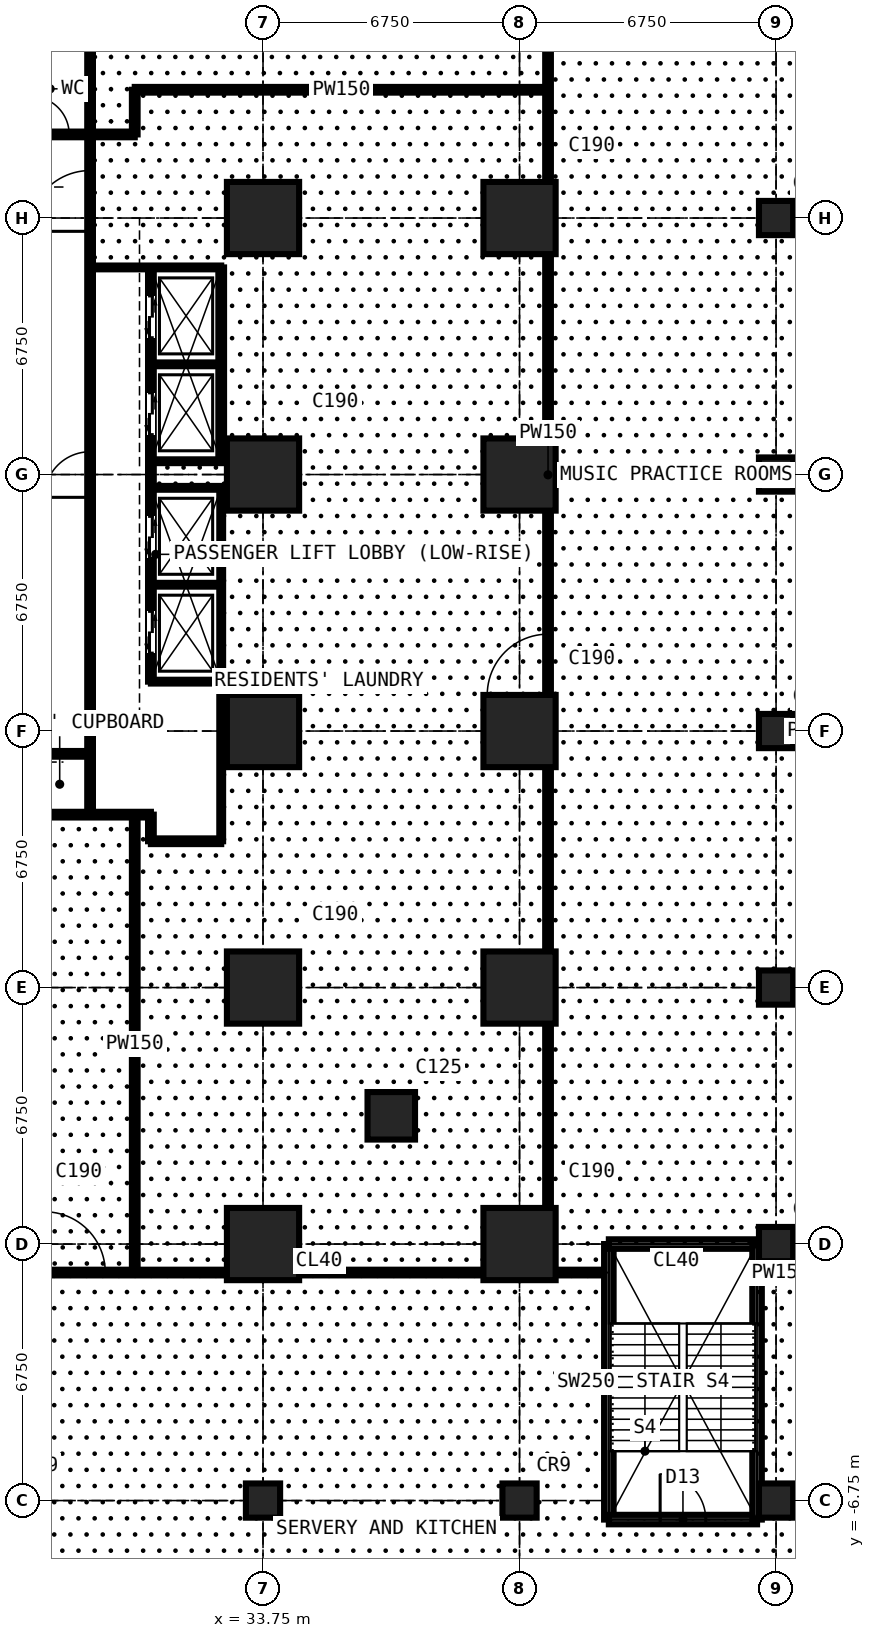
"""IFC4 building model, lengths in metres.
Left out: names, types, materials, properties, quantities, classifications, styles, units other than length and angle.
Written with IfcOpenShell. Run it as: python <this file> out.ifc"""

import sys

from ifc_helpers import new_model, si_unit, direction, frame, frame_2d, origin, origin_2d, place, context, subcontext, project, spatial, rectangle, circle, extrude, element, fill, save


model = new_model("IFC4")
c1 = context("Model", 3, precision=1e-05, world=origin(), true_north=direction((0.0, 1.0)))
c2 = subcontext(c1, "Body", "Model", "MODEL_VIEW")
j1 = project(units=[si_unit("LENGTHUNIT", "METRE"), si_unit("PLANEANGLEUNIT", "RADIAN")], contexts=[c1])
p1 = place(None, origin())
s1 = spatial("IfcSite", under=j1, at=p1, CompositionType="ELEMENT")
p2 = place(p1, origin())
s2 = spatial("IfcBuilding", under=s1, at=p2, CompositionType="ELEMENT")
p3 = place(p2, frame((0.0, 0.0, 4.5)))
s3 = spatial("IfcBuildingStorey", under=s2, at=p3, CompositionType="ELEMENT", Elevation=4.5)
p4 = place(p3, frame((33.75, -6.75, 0.0), z_axis=(0.0, 0.0, 1.0), x_axis=(1.0, 0.0, 0.0)))
e1 = element("IfcColumn", 1, at=p4, inside=s3, PredefinedType="COLUMN", context=c2, shape_type="SweptSolid", body=[
    extrude(circle(Radius=0.45, at=origin_2d()), origin(), (0.0, 0.0, 1.0), 4.5),
])
for number, where, z_axis, x_axis in (
    (2, (33.75, 0.0, 0.0), (0.0, 0.0, 1.0), (1.0, 0.0, 0.0)),
    (3, (33.75, 6.75, 0.0), (0.0, 0.0, 1.0), (1.0, 0.0, 0.0)),
    (4, (33.75, 13.5, 0.0), (0.0, 0.0, 1.0), (1.0, 0.0, 0.0)),
    (5, (33.75, 20.25, 0.0), (0.0, 0.0, 1.0), (1.0, 0.0, 0.0)),
    (6, (33.75, 27.0, 0.0), (0.0, 0.0, 1.0), (1.0, 0.0, 0.0)),
):
    element("IfcColumn", number, at=place(p3, frame(where, z_axis=z_axis, x_axis=x_axis)), inside=s3, PredefinedType="COLUMN", context=c2, shape_type="SweptSolid", body=[
        extrude(rectangle(XDim=1.9, YDim=1.9, at=origin_2d()), origin(), (0.0, 0.0, 1.0), 4.5),
    ])
p5 = place(p3, frame((37.125, 3.375, 0.0), z_axis=(0.0, 0.0, 1.0), x_axis=(1.0, 0.0, 0.0)))
e7 = element("IfcColumn", 7, at=p5, inside=s3, PredefinedType="COLUMN", context=c2, shape_type="SweptSolid", body=[
    extrude(rectangle(XDim=1.25, YDim=1.25, at=origin_2d()), origin(), (0.0, 0.0, 1.0), 4.5),
])
p6 = place(p3, frame((40.5, -6.75, 0.0), z_axis=(0.0, 0.0, 1.0), x_axis=(1.0, 0.0, 0.0)))
e8 = element("IfcColumn", 8, at=p6, inside=s3, PredefinedType="COLUMN", context=c2, shape_type="SweptSolid", body=[
    extrude(circle(Radius=0.45, at=origin_2d()), origin(), (0.0, 0.0, 1.0), 4.5),
])
for number, where, z_axis, x_axis in (
    (9, (40.5, 0.0, 0.0), (0.0, 0.0, 1.0), (1.0, 0.0, 0.0)),
    (10, (40.5, 6.75, 0.0), (0.0, 0.0, 1.0), (1.0, 0.0, 0.0)),
    (11, (40.5, 13.5, 0.0), (0.0, 0.0, 1.0), (1.0, 0.0, 0.0)),
    (12, (40.5, 20.25, 0.0), (0.0, 0.0, 1.0), (1.0, 0.0, 0.0)),
    (13, (40.5, 27.0, 0.0), (0.0, 0.0, 1.0), (1.0, 0.0, 0.0)),
):
    element("IfcColumn", number, at=place(p3, frame(where, z_axis=z_axis, x_axis=x_axis)), inside=s3, PredefinedType="COLUMN", context=c2, shape_type="SweptSolid", body=[
        extrude(rectangle(XDim=1.9, YDim=1.9, at=origin_2d()), origin(), (0.0, 0.0, 1.0), 4.5),
    ])
for number, where, z_axis, x_axis in (
    (14, (47.25, -6.75, 0.0), (0.0, 0.0, 1.0), (1.0, 0.0, 0.0)),
    (15, (47.25, 0.0, 0.0), (0.0, 0.0, 1.0), (1.0, 0.0, 0.0)),
    (16, (47.25, 6.75, 0.0), (0.0, 0.0, 1.0), (1.0, 0.0, 0.0)),
    (17, (47.25, 13.5, 0.0), (0.0, 0.0, 1.0), (1.0, 0.0, 0.0)),
    (18, (47.25, 20.25, 0.0), (0.0, 0.0, 1.0), (1.0, 0.0, 0.0)),
    (19, (47.25, 27.0, 0.0), (0.0, 0.0, 1.0), (1.0, 0.0, 0.0)),
):
    element("IfcColumn", number, at=place(p3, frame(where, z_axis=z_axis, x_axis=x_axis)), inside=s3, PredefinedType="COLUMN", context=c2, shape_type="SweptSolid", body=[
        extrude(circle(Radius=0.45, at=origin_2d()), origin(), (0.0, 0.0, 1.0), 4.5),
    ])
p7 = place(p3, frame((-7.484, -0.75, 0.0), z_axis=(0.0, 0.0, 1.0), x_axis=(1.0, 0.0, 0.0)))
e20 = element("IfcWall", 20, at=p7, inside=s3, PredefinedType="PARTITIONING", context=c2, shape_type="SweptSolid", body=[
    extrude(rectangle(XDim=50.334, YDim=0.15, at=frame_2d((25.167, 0.0))), origin(), (0.0, 0.0, 1.0), 4.25),
])
p8 = place(p7, frame((18.384, 0.0, 0.0)))
e21 = element("IfcOpeningElement", 21, at=p8, cuts=e20, PredefinedType="OPENING", context=c2, shape_type="SweptSolid", body=[
    extrude(rectangle(XDim=1.6, YDim=2.4, at=frame_2d((0.8, 1.2))), frame((0.0, 0.085, 0.0), z_axis=(0.0, -1.0, 0.0), x_axis=(1.0, 0.0, 0.0)), (0.0, 0.0, 1.0), 0.17),
])
p9 = place(p7, frame((35.484, 0.0, 0.0)))
e22 = element("IfcOpeningElement", 22, at=p9, cuts=e20, PredefinedType="OPENING", context=c2, shape_type="SweptSolid", body=[
    extrude(rectangle(XDim=1.6, YDim=2.4, at=frame_2d((0.8, 1.2))), frame((0.0, 0.085, 0.0), z_axis=(0.0, -1.0, 0.0), x_axis=(1.0, 0.0, 0.0)), (0.0, 0.0, 1.0), 0.17),
])
p10 = place(p3, frame((8.9, 29.2, 0.0), z_axis=(0.0, 0.0, 1.0), x_axis=(1.0, 0.0, 0.0)))
e23 = element("IfcWall", 23, at=p10, inside=s3, PredefinedType="PARTITIONING", context=c2, shape_type="SweptSolid", body=[
    extrude(rectangle(XDim=21.475, YDim=0.15, at=frame_2d((10.738, 0.0))), origin(), (0.0, 0.0, 1.0), 4.25),
])
p11 = place(p10, frame((16.65, 0.0, 0.0)))
e24 = element("IfcOpeningElement", 24, at=p11, cuts=e23, PredefinedType="OPENING", context=c2, shape_type="SweptSolid", body=[
    extrude(rectangle(XDim=1.0, YDim=2.2, at=frame_2d((0.5, 1.1))), frame((0.0, 0.085, 0.0), z_axis=(0.0, -1.0, 0.0), x_axis=(1.0, 0.0, 0.0)), (0.0, 0.0, 1.0), 0.17),
])
p12 = place(p10, frame((18.75, 0.0, 0.0)))
e25 = element("IfcOpeningElement", 25, at=p12, cuts=e23, PredefinedType="OPENING", context=c2, shape_type="SweptSolid", body=[
    extrude(rectangle(XDim=1.0, YDim=2.2, at=frame_2d((0.5, 1.1))), frame((0.0, 0.085, 0.0), z_axis=(0.0, -1.0, 0.0), x_axis=(1.0, 0.0, 0.0)), (0.0, 0.0, 1.0), 0.17),
])
p13 = place(p10, frame((8.45, 0.0, 0.0)))
e26 = element("IfcOpeningElement", 26, at=p13, cuts=e23, PredefinedType="OPENING", context=c2, shape_type="SweptSolid", body=[
    extrude(rectangle(XDim=1.6, YDim=2.4, at=frame_2d((0.8, 1.2))), frame((0.0, 0.085, 0.0), z_axis=(0.0, -1.0, 0.0), x_axis=(1.0, 0.0, 0.0)), (0.0, 0.0, 1.0), 0.17),
])
p14 = place(p3, frame((10.125, 11.3, 0.0), z_axis=(0.0, 0.0, 1.0), x_axis=(1.0, 0.0, 0.0)))
e27 = element("IfcWall", 27, at=p14, inside=s3, PredefinedType="PARTITIONING", context=c2, shape_type="SweptSolid", body=[
    extrude(rectangle(XDim=20.675, YDim=0.15, at=frame_2d((10.337, 0.0))), origin(), (0.0, 0.0, 1.0), 4.25),
])
p15 = place(p14, frame((1.725, 0.0, 0.0)))
e28 = element("IfcOpeningElement", 28, at=p15, cuts=e27, PredefinedType="OPENING", context=c2, shape_type="SweptSolid", body=[
    extrude(rectangle(XDim=1.0, YDim=2.2, at=frame_2d((0.5, 1.1))), frame((0.0, 0.085, 0.0), z_axis=(0.0, -1.0, 0.0), x_axis=(1.0, 0.0, 0.0)), (0.0, 0.0, 1.0), 0.17),
])
p16 = place(p14, frame((3.825, 0.0, 0.0)))
e29 = element("IfcOpeningElement", 29, at=p16, cuts=e27, PredefinedType="OPENING", context=c2, shape_type="SweptSolid", body=[
    extrude(rectangle(XDim=1.0, YDim=2.2, at=frame_2d((0.5, 1.1))), frame((0.0, 0.085, 0.0), z_axis=(0.0, -1.0, 0.0), x_axis=(1.0, 0.0, 0.0)), (0.0, 0.0, 1.0), 0.17),
])
p17 = place(p14, frame((10.625, 0.0, 0.0)))
e30 = element("IfcOpeningElement", 30, at=p17, cuts=e27, PredefinedType="OPENING", context=c2, shape_type="SweptSolid", body=[
    extrude(rectangle(XDim=1.6, YDim=2.4, at=frame_2d((0.8, 1.2))), frame((0.0, 0.085, 0.0), z_axis=(0.0, -1.0, 0.0), x_axis=(1.0, 0.0, 0.0)), (0.0, 0.0, 1.0), 0.17),
])
p18 = place(p3, frame((27.6, 12.9, 0.0), z_axis=(0.0, 0.0, 1.0), x_axis=(1.0, 0.0, 0.0)))
e31 = element("IfcWall", 31, at=p18, inside=s3, PredefinedType="PARTITIONING", context=c2, shape_type="SweptSolid", body=[
    extrude(rectangle(XDim=1.6, YDim=0.15, at=frame_2d((0.8, 0.0))), origin(), (0.0, 0.0, 1.0), 3.752),
])
p19 = place(p3, frame((29.2, 11.3, 0.0), z_axis=(0.0, 0.0, 1.0), x_axis=(0.0, 1.0, 0.0)))
e32 = element("IfcWall", 32, at=p19, inside=s3, PredefinedType="PARTITIONING", context=c2, shape_type="SweptSolid", body=[
    extrude(rectangle(XDim=20.3, YDim=0.15, at=frame_2d((10.15, 0.0))), origin(), (0.0, 0.0, 1.0), 4.25),
])
p20 = place(p19, frame((15.35, 0.0, 0.0)))
e33 = element("IfcOpeningElement", 33, at=p20, cuts=e32, PredefinedType="OPENING", context=c2, shape_type="SweptSolid", body=[
    extrude(rectangle(XDim=1.6, YDim=2.4, at=frame_2d((0.8, 1.2))), frame((0.0, 0.085, 0.0), z_axis=(0.0, -1.0, 0.0), x_axis=(1.0, 0.0, 0.0)), (0.0, 0.0, 1.0), 0.17),
])
p21 = place(p19, frame((8.35, 0.0, 0.0)))
e34 = element("IfcOpeningElement", 34, at=p21, cuts=e32, PredefinedType="OPENING", context=c2, shape_type="SweptSolid", body=[
    extrude(rectangle(XDim=1.2, YDim=2.2, at=frame_2d((0.6, 1.1))), frame((0.0, 0.085, 0.0), z_axis=(0.0, -1.0, 0.0), x_axis=(1.0, 0.0, 0.0)), (0.0, 0.0, 1.0), 0.17),
])
p22 = place(p3, frame((29.2, 25.7, 0.0), z_axis=(0.0, 0.0, 1.0), x_axis=(1.0, 0.0, 0.0)))
e35 = element("IfcWall", 35, at=p22, inside=s3, PredefinedType="SHEAR", context=c2, shape_type="SweptSolid", body=[
    extrude(rectangle(XDim=3.45, YDim=0.1, at=frame_2d((1.725, 0.0))), origin(), (0.0, 0.0, 1.0), 4.25),
])
p23 = place(p3, frame((30.375, -0.75, 0.0), z_axis=(0.0, 0.0, 1.0), x_axis=(0.0, 1.0, 0.0)))
e36 = element("IfcWall", 36, at=p23, inside=s3, PredefinedType="PARTITIONING", context=c2, shape_type="SweptSolid", body=[
    extrude(rectangle(XDim=12.05, YDim=0.15, at=frame_2d((6.025, 0.0))), origin(), (0.0, 0.0, 1.0), 4.25),
])
p24 = place(p3, frame((30.375, 29.2, 0.0), z_axis=(0.0, 0.0, 1.0), x_axis=(0.0, 1.0, 0.0)))
e37 = element("IfcWall", 37, at=p24, inside=s3, PredefinedType="PARTITIONING", context=c2, shape_type="SweptSolid", body=[
    extrude(rectangle(XDim=1.175, YDim=0.15, at=frame_2d((0.587, 0.0))), origin(), (0.0, 0.0, 1.0), 4.25),
])
p25 = place(p3, frame((30.375, 30.375, 0.0), z_axis=(0.0, 0.0, 1.0), x_axis=(1.0, 0.0, 0.0)))
e38 = element("IfcWall", 38, at=p25, inside=s3, PredefinedType="PARTITIONING", context=c2, shape_type="SweptSolid", body=[
    extrude(rectangle(XDim=10.875, YDim=0.15, at=frame_2d((5.438, 0.0))), origin(), (0.0, 0.0, 1.0), 4.25),
])
p26 = place(p3, frame((30.8, 10.6, 0.0), z_axis=(0.0, 0.0, 1.0), x_axis=(0.0, 1.0, 0.0)))
e39 = element("IfcWall", 39, at=p26, inside=s3, PredefinedType="PARTITIONING", context=c2, shape_type="SweptSolid", body=[
    extrude(rectangle(XDim=0.7, YDim=0.15, at=frame_2d((0.35, 0.0))), origin(), (0.0, 0.0, 1.0), 4.25),
])
p27 = place(p3, frame((30.8, 10.6, 0.0), z_axis=(0.0, 0.0, 1.0), x_axis=(1.0, 0.0, 0.0)))
e40 = element("IfcWall", 40, at=p27, inside=s3, PredefinedType="PARTITIONING", context=c2, shape_type="SweptSolid", body=[
    extrude(rectangle(XDim=1.85, YDim=0.15, at=frame_2d((0.925, 0.0))), origin(), (0.0, 0.0, 1.0), 4.25),
])
p28 = place(p3, frame((30.8, 14.8, 0.0), z_axis=(0.0, 0.0, 1.0), x_axis=(0.0, 1.0, 0.0)))
e41 = element("IfcWall", 41, at=p28, inside=s3, PredefinedType="PARTITIONING", context=c2, shape_type="SweptSolid", body=[
    extrude(rectangle(XDim=10.9, YDim=0.15, at=frame_2d((5.45, 0.0))), origin(), (0.0, 0.0, 1.0), 4.25),
])
p29 = place(p28, frame((0.75, 0.0, 0.0)))
e42 = element("IfcOpeningElement", 42, at=p29, cuts=e41, PredefinedType="OPENING", context=c2, shape_type="SweptSolid", body=[
    extrude(rectangle(XDim=1.1, YDim=2.2, at=frame_2d((0.55, 1.1))), frame((0.0, 0.085, 0.0), z_axis=(0.0, -1.0, 0.0), x_axis=(1.0, 0.0, 0.0)), (0.0, 0.0, 1.0), 0.17),
])
p30 = place(p28, frame((3.25, 0.0, 0.0)))
e43 = element("IfcOpeningElement", 43, at=p30, cuts=e41, PredefinedType="OPENING", context=c2, shape_type="SweptSolid", body=[
    extrude(rectangle(XDim=1.1, YDim=2.2, at=frame_2d((0.55, 1.1))), frame((0.0, 0.085, 0.0), z_axis=(0.0, -1.0, 0.0), x_axis=(1.0, 0.0, 0.0)), (0.0, 0.0, 1.0), 0.17),
])
p31 = place(p28, frame((6.5, 0.0, 0.0)))
e44 = element("IfcOpeningElement", 44, at=p31, cuts=e41, PredefinedType="OPENING", context=c2, shape_type="SweptSolid", body=[
    extrude(rectangle(XDim=1.1, YDim=2.2, at=frame_2d((0.55, 1.1))), frame((0.0, 0.085, 0.0), z_axis=(0.0, -1.0, 0.0), x_axis=(1.0, 0.0, 0.0)), (0.0, 0.0, 1.0), 0.17),
])
p32 = place(p28, frame((9.05, 0.0, 0.0)))
e45 = element("IfcOpeningElement", 45, at=p32, cuts=e41, PredefinedType="OPENING", context=c2, shape_type="SweptSolid", body=[
    extrude(rectangle(XDim=1.1, YDim=2.2, at=frame_2d((0.55, 1.1))), frame((0.0, 0.085, 0.0), z_axis=(0.0, -1.0, 0.0), x_axis=(1.0, 0.0, 0.0)), (0.0, 0.0, 1.0), 0.17),
])
for number, where, z_axis, x_axis in (
    (46, (30.8, 14.8, 0.0), (0.0, 0.0, 1.0), (1.0, 0.0, 0.0)),
    (47, (30.8, 17.35, 0.0), (0.0, 0.0, 1.0), (1.0, 0.0, 0.0)),
    (48, (30.8, 19.9, 0.0), (0.0, 0.0, 1.0), (1.0, 0.0, 0.0)),
    (49, (30.8, 20.6, 0.0), (0.0, 0.0, 1.0), (1.0, 0.0, 0.0)),
    (50, (30.8, 23.15, 0.0), (0.0, 0.0, 1.0), (1.0, 0.0, 0.0)),
):
    element("IfcWall", number, at=place(p3, frame(where, z_axis=z_axis, x_axis=x_axis)), inside=s3, PredefinedType="SHEAR", context=c2, shape_type="SweptSolid", body=[
        extrude(rectangle(XDim=1.85, YDim=0.1, at=frame_2d((0.925, 0.0))), origin(), (0.0, 0.0, 1.0), 4.25),
    ])
p33 = place(p3, frame((32.65, 10.6, 0.0), z_axis=(0.0, 0.0, 1.0), x_axis=(0.0, 1.0, 0.0)))
e51 = element("IfcWall", 51, at=p33, inside=s3, PredefinedType="SHEAR", context=c2, shape_type="SweptSolid", body=[
    extrude(rectangle(XDim=9.3, YDim=0.1, at=frame_2d((4.65, 0.0))), origin(), (0.0, 0.0, 1.0), 4.25),
])
p34 = place(p3, frame((32.65, 20.6, 0.0), z_axis=(0.0, 0.0, 1.0), x_axis=(0.0, 1.0, 0.0)))
e52 = element("IfcWall", 52, at=p34, inside=s3, PredefinedType="PARTITIONING", context=c2, shape_type="SweptSolid", body=[
    extrude(rectangle(XDim=5.1, YDim=0.15, at=frame_2d((2.55, 0.0))), origin(), (0.0, 0.0, 1.0), 4.25),
])
p35 = place(p3, frame((41.25, -0.75, 0.0), z_axis=(0.0, 0.0, 1.0), x_axis=(0.0, 1.0, 0.0)))
e53 = element("IfcWall", 53, at=p35, inside=s3, PredefinedType="PARTITIONING", context=c2, shape_type="SweptSolid", body=[
    extrude(rectangle(XDim=41.984, YDim=0.15, at=frame_2d((20.992, 0.0))), origin(), (0.0, 0.0, 1.0), 4.25),
])
p36 = place(p35, frame((15.2, 0.0, 0.0)))
e54 = element("IfcOpeningElement", 54, at=p36, cuts=e53, PredefinedType="OPENING", context=c2, shape_type="SweptSolid", body=[
    extrude(rectangle(XDim=1.6, YDim=2.4, at=frame_2d((0.8, 1.2))), frame((0.0, 0.085, 0.0), z_axis=(0.0, -1.0, 0.0), x_axis=(1.0, 0.0, 0.0)), (0.0, 0.0, 1.0), 0.17),
])
p37 = place(p3, frame((42.85, -7.25, 0.0), z_axis=(0.0, 0.0, 1.0), x_axis=(0.0, 1.0, 0.0)))
e55 = element("IfcWall", 55, at=p37, inside=s3, PredefinedType="SOLIDWALL", context=c2, shape_type="SweptSolid", body=[
    extrude(rectangle(XDim=7.25, YDim=0.25, at=frame_2d((3.625, 0.0))), origin(), (0.0, 0.0, 1.0), 4.25),
])
p38 = place(p3, frame((42.85, -7.25, 0.0), z_axis=(0.0, 0.0, 1.0), x_axis=(1.0, 0.0, 0.0)))
e56 = element("IfcWall", 56, at=p38, inside=s3, PredefinedType="SOLIDWALL", context=c2, shape_type="SweptSolid", body=[
    extrude(rectangle(XDim=3.9, YDim=0.25, at=frame_2d((1.95, 0.0))), origin(), (0.0, 0.0, 1.0), 4.25),
])
p39 = place(p38, frame((1.35, 0.0, 0.0)))
e57 = element("IfcOpeningElement", 57, at=p39, cuts=e56, PredefinedType="OPENING", context=c2, shape_type="SweptSolid", body=[
    extrude(rectangle(XDim=1.2, YDim=2.2, at=frame_2d((0.6, 1.1))), frame((0.0, 0.135, 0.0), z_axis=(0.0, -1.0, 0.0), x_axis=(1.0, 0.0, 0.0)), (0.0, 0.0, 1.0), 0.27),
])
p40 = place(p3, frame((42.85, 0.0, 0.0), z_axis=(0.0, 0.0, 1.0), x_axis=(1.0, 0.0, 0.0)))
e58 = element("IfcWall", 58, at=p40, inside=s3, PredefinedType="SOLIDWALL", context=c2, shape_type="SweptSolid", body=[
    extrude(rectangle(XDim=3.9, YDim=0.25, at=frame_2d((1.95, 0.0))), origin(), (0.0, 0.0, 1.0), 4.25),
])
p41 = place(p3, frame((46.75, -7.25, 0.0), z_axis=(0.0, 0.0, 1.0), x_axis=(0.0, 1.0, 0.0)))
e59 = element("IfcWall", 59, at=p41, inside=s3, PredefinedType="SOLIDWALL", context=c2, shape_type="SweptSolid", body=[
    extrude(rectangle(XDim=7.25, YDim=0.25, at=frame_2d((3.625, 0.0))), origin(), (0.0, 0.0, 1.0), 4.25),
])
p42 = place(p3, frame((46.75, -0.75, 0.0), z_axis=(0.0, 0.0, 1.0), x_axis=(1.0, 0.0, 0.0)))
e60 = element("IfcWall", 60, at=p42, inside=s3, PredefinedType="PARTITIONING", context=c2, shape_type="SweptSolid", body=[
    extrude(rectangle(XDim=1.234, YDim=0.15, at=frame_2d((0.617, 0.0))), origin(), (0.0, 0.0, 1.0), 4.25),
])
p43 = place(p20, origin())
e61 = element("IfcDoor", 61, at=p43, inside=s3, OperationType="DOUBLE_DOOR_SINGLE_SWING", PredefinedType="DOOR", context=c2, shape_type="SweptSolid", body=[
    extrude(rectangle(XDim=1.6, YDim=2.4, at=frame_2d((0.8, 1.2))), frame((0.0, 0.025, 0.0), z_axis=(0.0, -1.0, 0.0), x_axis=(1.0, 0.0, 0.0)), (0.0, 0.0, 1.0), 0.05),
])
fill(e33, e61)
p44 = place(p12, origin())
e62 = element("IfcDoor", 62, at=p44, inside=s3, OperationType="SINGLE_SWING_LEFT", PredefinedType="DOOR", context=c2, shape_type="SweptSolid", body=[
    extrude(rectangle(XDim=1.0, YDim=2.2, at=frame_2d((0.5, 1.1))), frame((0.0, 0.025, 0.0), z_axis=(0.0, -1.0, 0.0), x_axis=(1.0, 0.0, 0.0)), (0.0, 0.0, 1.0), 0.05),
])
fill(e25, e62)
p45 = place(p9, origin())
e63 = element("IfcDoor", 63, at=p45, inside=s3, OperationType="DOUBLE_DOOR_SINGLE_SWING", PredefinedType="DOOR", context=c2, shape_type="SweptSolid", body=[
    extrude(rectangle(XDim=1.6, YDim=2.4, at=frame_2d((0.8, 1.2))), frame((0.0, 0.025, 0.0), z_axis=(0.0, -1.0, 0.0), x_axis=(1.0, 0.0, 0.0)), (0.0, 0.0, 1.0), 0.05),
])
fill(e22, e63)
p46 = place(p36, origin())
e64 = element("IfcDoor", 64, at=p46, inside=s3, OperationType="DOUBLE_DOOR_SINGLE_SWING", PredefinedType="DOOR", context=c2, shape_type="SweptSolid", body=[
    extrude(rectangle(XDim=1.6, YDim=2.4, at=frame_2d((0.8, 1.2))), frame((0.0, 0.025, 0.0), z_axis=(0.0, -1.0, 0.0), x_axis=(1.0, 0.0, 0.0)), (0.0, 0.0, 1.0), 0.05),
])
fill(e54, e64)
p47 = place(p39, origin())
e65 = element("IfcDoor", 65, at=p47, inside=s3, OperationType="SINGLE_SWING_LEFT", PredefinedType="DOOR", context=c2, shape_type="SweptSolid", body=[
    extrude(rectangle(XDim=1.2, YDim=2.2, at=frame_2d((0.6, 1.1))), frame((0.0, 0.025, 0.0), z_axis=(0.0, -1.0, 0.0), x_axis=(1.0, 0.0, 0.0)), (0.0, 0.0, 1.0), 0.05),
])
fill(e57, e65)
p48 = place(p29, origin())
e66 = element("IfcDoor", 66, at=p48, inside=s3, OperationType="DOUBLE_DOOR_SLIDING", PredefinedType="DOOR", context=c2, shape_type="SweptSolid", body=[
    extrude(rectangle(XDim=1.1, YDim=2.2, at=frame_2d((0.55, 1.1))), frame((0.0, 0.025, 0.0), z_axis=(0.0, -1.0, 0.0), x_axis=(1.0, 0.0, 0.0)), (0.0, 0.0, 1.0), 0.05),
])
fill(e42, e66)
p49 = place(p30, origin())
e67 = element("IfcDoor", 67, at=p49, inside=s3, OperationType="DOUBLE_DOOR_SLIDING", PredefinedType="DOOR", context=c2, shape_type="SweptSolid", body=[
    extrude(rectangle(XDim=1.1, YDim=2.2, at=frame_2d((0.55, 1.1))), frame((0.0, 0.025, 0.0), z_axis=(0.0, -1.0, 0.0), x_axis=(1.0, 0.0, 0.0)), (0.0, 0.0, 1.0), 0.05),
])
fill(e43, e67)
p50 = place(p31, origin())
e68 = element("IfcDoor", 68, at=p50, inside=s3, OperationType="DOUBLE_DOOR_SLIDING", PredefinedType="DOOR", context=c2, shape_type="SweptSolid", body=[
    extrude(rectangle(XDim=1.1, YDim=2.2, at=frame_2d((0.55, 1.1))), frame((0.0, 0.025, 0.0), z_axis=(0.0, -1.0, 0.0), x_axis=(1.0, 0.0, 0.0)), (0.0, 0.0, 1.0), 0.05),
])
fill(e44, e68)
p51 = place(p32, origin())
e69 = element("IfcDoor", 69, at=p51, inside=s3, OperationType="DOUBLE_DOOR_SLIDING", PredefinedType="DOOR", context=c2, shape_type="SweptSolid", body=[
    extrude(rectangle(XDim=1.1, YDim=2.2, at=frame_2d((0.55, 1.1))), frame((0.0, 0.025, 0.0), z_axis=(0.0, -1.0, 0.0), x_axis=(1.0, 0.0, 0.0)), (0.0, 0.0, 1.0), 0.05),
])
fill(e45, e69)
p52 = place(p21, origin())
e70 = element("IfcDoor", 70, at=p52, inside=s3, OperationType="DOUBLE_DOOR_SINGLE_SWING", PredefinedType="DOOR", context=c2, shape_type="SweptSolid", body=[
    extrude(rectangle(XDim=1.2, YDim=2.2, at=frame_2d((0.6, 1.1))), frame((0.0, 0.025, 0.0), z_axis=(0.0, -1.0, 0.0), x_axis=(1.0, 0.0, 0.0)), (0.0, 0.0, 1.0), 0.05),
])
fill(e34, e70)
save(model, sys.argv[1])
